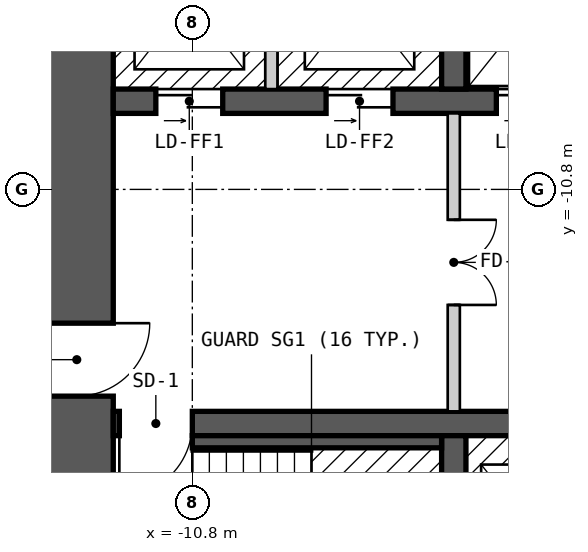
"""IFC4 building model, lengths in metres.
Left out: names, types, materials, properties, quantities, classifications, styles, units other than length and angle.
Written with IfcOpenShell. Run it as: python <this file> out.ifc"""

import sys

from ifc_helpers import new_model, si_unit, direction, frame, frame_2d, origin, place, context, subcontext, project, spatial, rectangle, extrude, element, fill, save


model = new_model("IFC4")
c1 = context("Model", 3, precision=1e-05, world=origin(), true_north=direction((0.0, 1.0)))
c2 = subcontext(c1, "Body", "Model", "MODEL_VIEW")
j1 = project(units=[si_unit("LENGTHUNIT", "METRE"), si_unit("PLANEANGLEUNIT", "RADIAN")], contexts=[c1])
p1 = place(None, origin())
s1 = spatial("IfcSite", under=j1, at=p1, CompositionType="ELEMENT")
p2 = place(p1, origin())
s2 = spatial("IfcBuilding", under=s1, at=p2, CompositionType="ELEMENT")
p3 = place(p2, frame((0.0, 0.0, 32.4)))
s3 = spatial("IfcBuildingStorey", under=s2, at=p3, CompositionType="ELEMENT", Elevation=32.4)
p4 = place(p3, frame((-12.7, -17.8, 0.0), z_axis=(0.0, 0.0, 1.0), x_axis=(0.0, 1.0, 0.0)))
e1 = element("IfcWall", 1, at=p4, inside=s3, PredefinedType="SHEAR", context=c2, shape_type="SweptSolid", body=[
    extrude(rectangle(XDim=11.6, YDim=1.2, at=frame_2d((5.8, 0.0))), origin(), (0.0, 0.0, 1.0), 2.7),
])
p5 = place(p4, frame((3.6, 0.0, 0.0)))
e2 = element("IfcOpeningElement", 2, at=p5, cuts=e1, PredefinedType="OPENING", context=c2, shape_type="SweptSolid", body=[
    extrude(rectangle(XDim=1.2, YDim=2.1, at=frame_2d((0.6, 1.05))), frame((0.0, 0.61, 0.0), z_axis=(0.0, -1.0, 0.0), x_axis=(1.0, 0.0, 0.0)), (0.0, 0.0, 1.0), 1.22),
])
p6 = place(p3, frame((-12.1, -14.65, 0.0), z_axis=(0.0, 0.0, 1.0), x_axis=(1.0, 0.0, 0.0)))
e3 = element("IfcWall", 3, at=p6, inside=s3, PredefinedType="SHEAR", context=c2, shape_type="SweptSolid", body=[
    extrude(rectangle(XDim=24.2, YDim=0.4, at=frame_2d((12.1, 0.0))), origin(), (0.0, 0.0, 1.0), 2.7),
])
p7 = place(p6, frame((1.3, 0.0, 0.0), z_axis=(0.0, 0.0, 1.0), x_axis=(-1.0, 0.0, 0.0)))
e4 = element("IfcOpeningElement", 4, at=p7, cuts=e3, PredefinedType="OPENING", context=c2, shape_type="SweptSolid", body=[
    extrude(rectangle(XDim=1.2, YDim=2.1, at=frame_2d((0.6, 1.05))), frame((0.0, 0.21, 0.0), z_axis=(0.0, -1.0, 0.0), x_axis=(1.0, 0.0, 0.0)), (0.0, 0.0, 1.0), 0.42),
])
p8 = place(p6, frame((24.15, 0.0, 0.0), z_axis=(0.0, 0.0, 1.0), x_axis=(-1.0, 0.0, 0.0)))
e5 = element("IfcOpeningElement", 5, at=p8, cuts=e3, PredefinedType="OPENING", context=c2, shape_type="SweptSolid", body=[
    extrude(rectangle(XDim=1.2, YDim=2.1, at=frame_2d((0.6, 1.05))), frame((0.0, 0.21, 0.0), z_axis=(0.0, -1.0, 0.0), x_axis=(1.0, 0.0, 0.0)), (0.0, 0.0, 1.0), 0.42),
])
p9 = place(p6, frame((16.6, 0.0, 0.0), z_axis=(0.0, 0.0, 1.0), x_axis=(-1.0, 0.0, 0.0)))
e6 = element("IfcOpeningElement", 6, at=p9, cuts=e3, PredefinedType="OPENING", context=c2, shape_type="SweptSolid", body=[
    extrude(rectangle(XDim=1.0, YDim=2.1, at=frame_2d((0.5, 1.05))), frame((0.0, 0.21, 0.0), z_axis=(0.0, -1.0, 0.0), x_axis=(1.0, 0.0, 0.0)), (0.0, 0.0, 1.0), 0.42),
])
p10 = place(p6, frame((18.35, 0.0, 0.0), z_axis=(0.0, 0.0, 1.0), x_axis=(-1.0, 0.0, 0.0)))
e7 = element("IfcOpeningElement", 7, at=p10, cuts=e3, PredefinedType="OPENING", context=c2, shape_type="SweptSolid", body=[
    extrude(rectangle(XDim=0.9, YDim=2.1, at=frame_2d((0.45, 1.05))), frame((0.0, 0.21, 0.0), z_axis=(0.0, -1.0, 0.0), x_axis=(1.0, 0.0, 0.0)), (0.0, 0.0, 1.0), 0.42),
])
p11 = place(p3, frame((-12.1, -9.35, 0.0), z_axis=(0.0, 0.0, 1.0), x_axis=(1.0, 0.0, 0.0)))
e8 = element("IfcWall", 8, at=p11, inside=s3, PredefinedType="SHEAR", context=c2, shape_type="SweptSolid", body=[
    extrude(rectangle(XDim=22.3, YDim=0.4, at=frame_2d((11.15, 0.0))), origin(), (0.0, 0.0, 1.0), 2.7),
])
p12 = place(p11, frame((0.7, 0.0, 0.0)))
e9 = element("IfcOpeningElement", 9, at=p12, cuts=e8, PredefinedType="OPENING", context=c2, shape_type="SweptSolid", body=[
    extrude(rectangle(XDim=1.1, YDim=2.1, at=frame_2d((0.55, 1.05))), frame((0.0, 0.21, 0.0), z_axis=(0.0, -1.0, 0.0), x_axis=(1.0, 0.0, 0.0)), (0.0, 0.0, 1.0), 0.42),
])
p13 = place(p11, frame((3.5, 0.0, 0.0)))
e10 = element("IfcOpeningElement", 10, at=p13, cuts=e8, PredefinedType="OPENING", context=c2, shape_type="SweptSolid", body=[
    extrude(rectangle(XDim=1.1, YDim=2.1, at=frame_2d((0.55, 1.05))), frame((0.0, 0.21, 0.0), z_axis=(0.0, -1.0, 0.0), x_axis=(1.0, 0.0, 0.0)), (0.0, 0.0, 1.0), 0.42),
])
p14 = place(p11, frame((6.3, 0.0, 0.0)))
e11 = element("IfcOpeningElement", 11, at=p14, cuts=e8, PredefinedType="OPENING", context=c2, shape_type="SweptSolid", body=[
    extrude(rectangle(XDim=1.1, YDim=2.1, at=frame_2d((0.55, 1.05))), frame((0.0, 0.21, 0.0), z_axis=(0.0, -1.0, 0.0), x_axis=(1.0, 0.0, 0.0)), (0.0, 0.0, 1.0), 0.42),
])
p15 = place(p11, frame((8.6, 0.0, 0.0)))
e12 = element("IfcOpeningElement", 12, at=p15, cuts=e8, PredefinedType="OPENING", context=c2, shape_type="SweptSolid", body=[
    extrude(rectangle(XDim=1.1, YDim=2.1, at=frame_2d((0.55, 1.05))), frame((0.0, 0.21, 0.0), z_axis=(0.0, -1.0, 0.0), x_axis=(1.0, 0.0, 0.0)), (0.0, 0.0, 1.0), 0.42),
])
p16 = place(p11, frame((10.9, 0.0, 0.0)))
e13 = element("IfcOpeningElement", 13, at=p16, cuts=e8, PredefinedType="OPENING", context=c2, shape_type="SweptSolid", body=[
    extrude(rectangle(XDim=1.1, YDim=2.1, at=frame_2d((0.55, 1.05))), frame((0.0, 0.21, 0.0), z_axis=(0.0, -1.0, 0.0), x_axis=(1.0, 0.0, 0.0)), (0.0, 0.0, 1.0), 0.42),
])
p17 = place(p11, frame((13.2, 0.0, 0.0)))
e14 = element("IfcOpeningElement", 14, at=p17, cuts=e8, PredefinedType="OPENING", context=c2, shape_type="SweptSolid", body=[
    extrude(rectangle(XDim=1.1, YDim=2.1, at=frame_2d((0.55, 1.05))), frame((0.0, 0.21, 0.0), z_axis=(0.0, -1.0, 0.0), x_axis=(1.0, 0.0, 0.0)), (0.0, 0.0, 1.0), 0.42),
])
p18 = place(p11, frame((15.5, 0.0, 0.0)))
e15 = element("IfcOpeningElement", 15, at=p18, cuts=e8, PredefinedType="OPENING", context=c2, shape_type="SweptSolid", body=[
    extrude(rectangle(XDim=1.1, YDim=2.1, at=frame_2d((0.55, 1.05))), frame((0.0, 0.21, 0.0), z_axis=(0.0, -1.0, 0.0), x_axis=(1.0, 0.0, 0.0)), (0.0, 0.0, 1.0), 0.42),
])
p19 = place(p11, frame((17.8, 0.0, 0.0)))
e16 = element("IfcOpeningElement", 16, at=p19, cuts=e8, PredefinedType="OPENING", context=c2, shape_type="SweptSolid", body=[
    extrude(rectangle(XDim=1.1, YDim=2.1, at=frame_2d((0.55, 1.05))), frame((0.0, 0.21, 0.0), z_axis=(0.0, -1.0, 0.0), x_axis=(1.0, 0.0, 0.0)), (0.0, 0.0, 1.0), 0.42),
])
p20 = place(p11, frame((20.2, 0.0, 0.0)))
e17 = element("IfcOpeningElement", 17, at=p20, cuts=e8, PredefinedType="OPENING", context=c2, shape_type="SweptSolid", body=[
    extrude(rectangle(XDim=1.1, YDim=2.1, at=frame_2d((0.55, 1.05))), frame((0.0, 0.21, 0.0), z_axis=(0.0, -1.0, 0.0), x_axis=(1.0, 0.0, 0.0)), (0.0, 0.0, 1.0), 0.42),
])
for number, where, z_axis, x_axis in (
    (18, (-6.5, -17.8, 0.0), (0.0, 0.0, 1.0), (0.0, 1.0, 0.0)),
    (19, (-6.5, -9.15, 0.0), (0.0, 0.0, 1.0), (0.0, 1.0, 0.0)),
):
    element("IfcWall", number, at=place(p3, frame(where, z_axis=z_axis, x_axis=x_axis)), inside=s3, PredefinedType="SHEAR", context=c2, shape_type="SweptSolid", body=[
        extrude(rectangle(XDim=2.95, YDim=0.4, at=frame_2d((1.475, 0.0))), origin(), (0.0, 0.0, 1.0), 2.7),
    ])
p21 = place(p3, frame((-10.8, -14.95, 0.0), z_axis=(0.0, 0.0, 1.0), x_axis=(1.0, 0.0, 0.0)))
e20 = element("IfcWall", 20, at=p21, inside=s3, PredefinedType="SOLIDWALL", context=c2, shape_type="SweptSolid", body=[
    extrude(rectangle(XDim=4.1, YDim=0.2, at=frame_2d((2.05, 0.0))), origin(), (0.0, 0.0, 1.0), 2.7),
])
p22 = place(p3, frame((-9.5, -9.15, 0.0), z_axis=(0.0, 0.0, 1.0), x_axis=(0.0, 1.0, 0.0)))
e21 = element("IfcWall", 21, at=p22, inside=s3, PredefinedType="SOLIDWALL", context=c2, shape_type="SweptSolid", body=[
    extrude(rectangle(XDim=2.95, YDim=0.2, at=frame_2d((1.475, 0.0))), origin(), (0.0, 0.0, 1.0), 2.7),
])
p23 = place(p3, frame((-6.5, -14.45, 0.0), z_axis=(0.0, 0.0, 1.0), x_axis=(0.0, 1.0, 0.0)))
e22 = element("IfcWall", 22, at=p23, inside=s3, PredefinedType="PARTITIONING", context=c2, shape_type="SweptSolid", body=[
    extrude(rectangle(XDim=4.9, YDim=0.2, at=frame_2d((2.45, 0.0))), origin(), (0.0, 0.0, 1.0), 2.7),
])
p24 = place(p23, frame((3.15, 0.0, 0.0), z_axis=(0.0, 0.0, 1.0), x_axis=(-1.0, 0.0, 0.0)))
e23 = element("IfcOpeningElement", 23, at=p24, cuts=e22, PredefinedType="OPENING", context=c2, shape_type="SweptSolid", body=[
    extrude(rectangle(XDim=1.4, YDim=2.1, at=frame_2d((0.7, 1.05))), frame((0.0, 0.11, 0.0), z_axis=(0.0, -1.0, 0.0), x_axis=(1.0, 0.0, 0.0)), (0.0, 0.0, 1.0), 0.22),
])
p25 = place(p12, origin())
e24 = element("IfcDoor", 24, at=p25, inside=s3, OperationType="DOUBLE_DOOR_SLIDING", PredefinedType="DOOR", context=c2, shape_type="SweptSolid", body=[
    extrude(rectangle(XDim=1.1, YDim=2.1, at=frame_2d((0.55, 1.05))), frame((0.0, 0.025, 0.0), z_axis=(0.0, -1.0, 0.0), x_axis=(1.0, 0.0, 0.0)), (0.0, 0.0, 1.0), 0.05),
])
fill(e9, e24)
p26 = place(p13, origin())
e25 = element("IfcDoor", 25, at=p26, inside=s3, OperationType="DOUBLE_DOOR_SLIDING", PredefinedType="DOOR", context=c2, shape_type="SweptSolid", body=[
    extrude(rectangle(XDim=1.1, YDim=2.1, at=frame_2d((0.55, 1.05))), frame((0.0, 0.025, 0.0), z_axis=(0.0, -1.0, 0.0), x_axis=(1.0, 0.0, 0.0)), (0.0, 0.0, 1.0), 0.05),
])
fill(e10, e25)
p27 = place(p14, origin())
e26 = element("IfcDoor", 26, at=p27, inside=s3, OperationType="DOUBLE_DOOR_SLIDING", PredefinedType="DOOR", context=c2, shape_type="SweptSolid", body=[
    extrude(rectangle(XDim=1.1, YDim=2.1, at=frame_2d((0.55, 1.05))), frame((0.0, 0.025, 0.0), z_axis=(0.0, -1.0, 0.0), x_axis=(1.0, 0.0, 0.0)), (0.0, 0.0, 1.0), 0.05),
])
fill(e11, e26)
p28 = place(p7, origin())
e27 = element("IfcDoor", 27, at=p28, inside=s3, OperationType="SINGLE_SWING_RIGHT", PredefinedType="DOOR", context=c2, shape_type="SweptSolid", body=[
    extrude(rectangle(XDim=1.2, YDim=2.1, at=frame_2d((0.6, 1.05))), frame((0.0, 0.025, 0.0), z_axis=(0.0, -1.0, 0.0), x_axis=(1.0, 0.0, 0.0)), (0.0, 0.0, 1.0), 0.05),
])
fill(e4, e27)
p29 = place(p5, origin())
e28 = element("IfcDoor", 28, at=p29, inside=s3, OperationType="SINGLE_SWING_RIGHT", PredefinedType="DOOR", context=c2, shape_type="SweptSolid", body=[
    extrude(rectangle(XDim=1.2, YDim=2.1, at=frame_2d((0.6, 1.05))), frame((0.0, 0.025, 0.0), z_axis=(0.0, -1.0, 0.0), x_axis=(1.0, 0.0, 0.0)), (0.0, 0.0, 1.0), 0.05),
])
fill(e2, e28)
p30 = place(p24, origin())
e29 = element("IfcDoor", 29, at=p30, inside=s3, OperationType="DOUBLE_DOOR_SINGLE_SWING", PredefinedType="DOOR", context=c2, shape_type="SweptSolid", body=[
    extrude(rectangle(XDim=1.4, YDim=2.1, at=frame_2d((0.7, 1.05))), frame((0.0, 0.025, 0.0), z_axis=(0.0, -1.0, 0.0), x_axis=(1.0, 0.0, 0.0)), (0.0, 0.0, 1.0), 0.05),
])
fill(e23, e29)
save(model, sys.argv[1])
